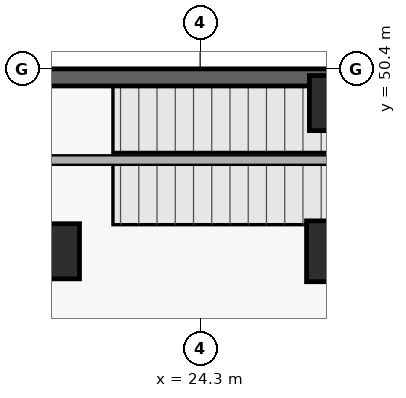
"""IFC4 building model, lengths in metres.
Left out: names, types, materials, properties, quantities, classifications, styles, units other than length and angle.
Written with IfcOpenShell. Run it as: python <this file> out.ifc"""

import sys

from ifc_helpers import new_model, si_unit, direction, frame, frame_2d, origin, origin_2d, place, context, subcontext, project, spatial, rectangle, extrude, source, transform, mapped, element, save


model = new_model("IFC4")
c1 = context("Model", 3, precision=1e-05, world=origin(), true_north=direction((0.0, 1.0)))
c2 = subcontext(c1, "Body", "Model", "MODEL_VIEW")
j1 = project(units=[si_unit("LENGTHUNIT", "METRE"), si_unit("PLANEANGLEUNIT", "RADIAN")], contexts=[c1])
p1 = place(None, origin())
s1 = spatial("IfcSite", under=j1, at=p1, CompositionType="ELEMENT")
p2 = place(p1, origin())
s2 = spatial("IfcBuilding", under=s1, at=p2, CompositionType="ELEMENT")
p3 = place(p2, frame((0.0, 0.0, -10.8)))
s3 = spatial("IfcBuildingStorey", under=s2, at=p3, CompositionType="ELEMENT", Elevation=-10.8)
p4 = place(p3, frame((64.575, 50.175, 0.0), z_axis=(0.0, 0.0, 1.0), x_axis=(-1.0, 0.0, 0.0)))
e1 = element("IfcWall", 1, at=p4, inside=s3, PredefinedType="USERDEFINED", context=c2, shape_type="SweptSolid", body=[
    extrude(rectangle(XDim=64.35, YDim=0.45, at=frame_2d((32.175, 0.0))), origin(), (0.0, 0.0, 1.0), 3.238),
])
m1 = source(origin(), c2, "Body", "SweptSolid", [
    extrude(rectangle(XDim=1.45, YDim=1.45, at=origin_2d()), origin(), (0.0, 0.0, 1.0), 3.24),
])
p5 = place(p3, frame((20.4, 45.6, 0.0), z_axis=(0.0, 0.0, 1.0), x_axis=(1.0, 0.0, 0.0)))
e2 = element("IfcColumn", 2, at=p5, inside=s3, PredefinedType="COLUMN", context=c2, shape_type="MappedRepresentation", body=[
    mapped(m1, transform((0.0, 0.0, 0.0), scale=1.0)),
])
m2 = source(origin(), c2, "Body", "SweptSolid", [
    extrude(rectangle(XDim=1.6, YDim=1.6, at=origin_2d()), origin(), (0.0, 0.0, 1.0), 3.24),
])
p6 = place(p3, frame((27.9, 45.6, 0.0), z_axis=(0.0, 0.0, 1.0), x_axis=(1.0, 0.0, 0.0)))
e3 = element("IfcColumn", 3, at=p6, inside=s3, PredefinedType="COLUMN", context=c2, shape_type="MappedRepresentation", body=[
    mapped(m2, transform((0.0, 0.0, 0.0), scale=1.0)),
])
p7 = place(p3, frame((27.9, 49.5, 0.0), z_axis=(0.0, 0.0, 1.0), x_axis=(1.0, 0.0, 0.0)))
e4 = element("IfcColumn", 4, at=p7, inside=s3, PredefinedType="COLUMN", context=c2, shape_type="MappedRepresentation", body=[
    mapped(m1, transform((0.0, 0.0, 0.0), scale=1.0)),
])
save(model, sys.argv[1])
